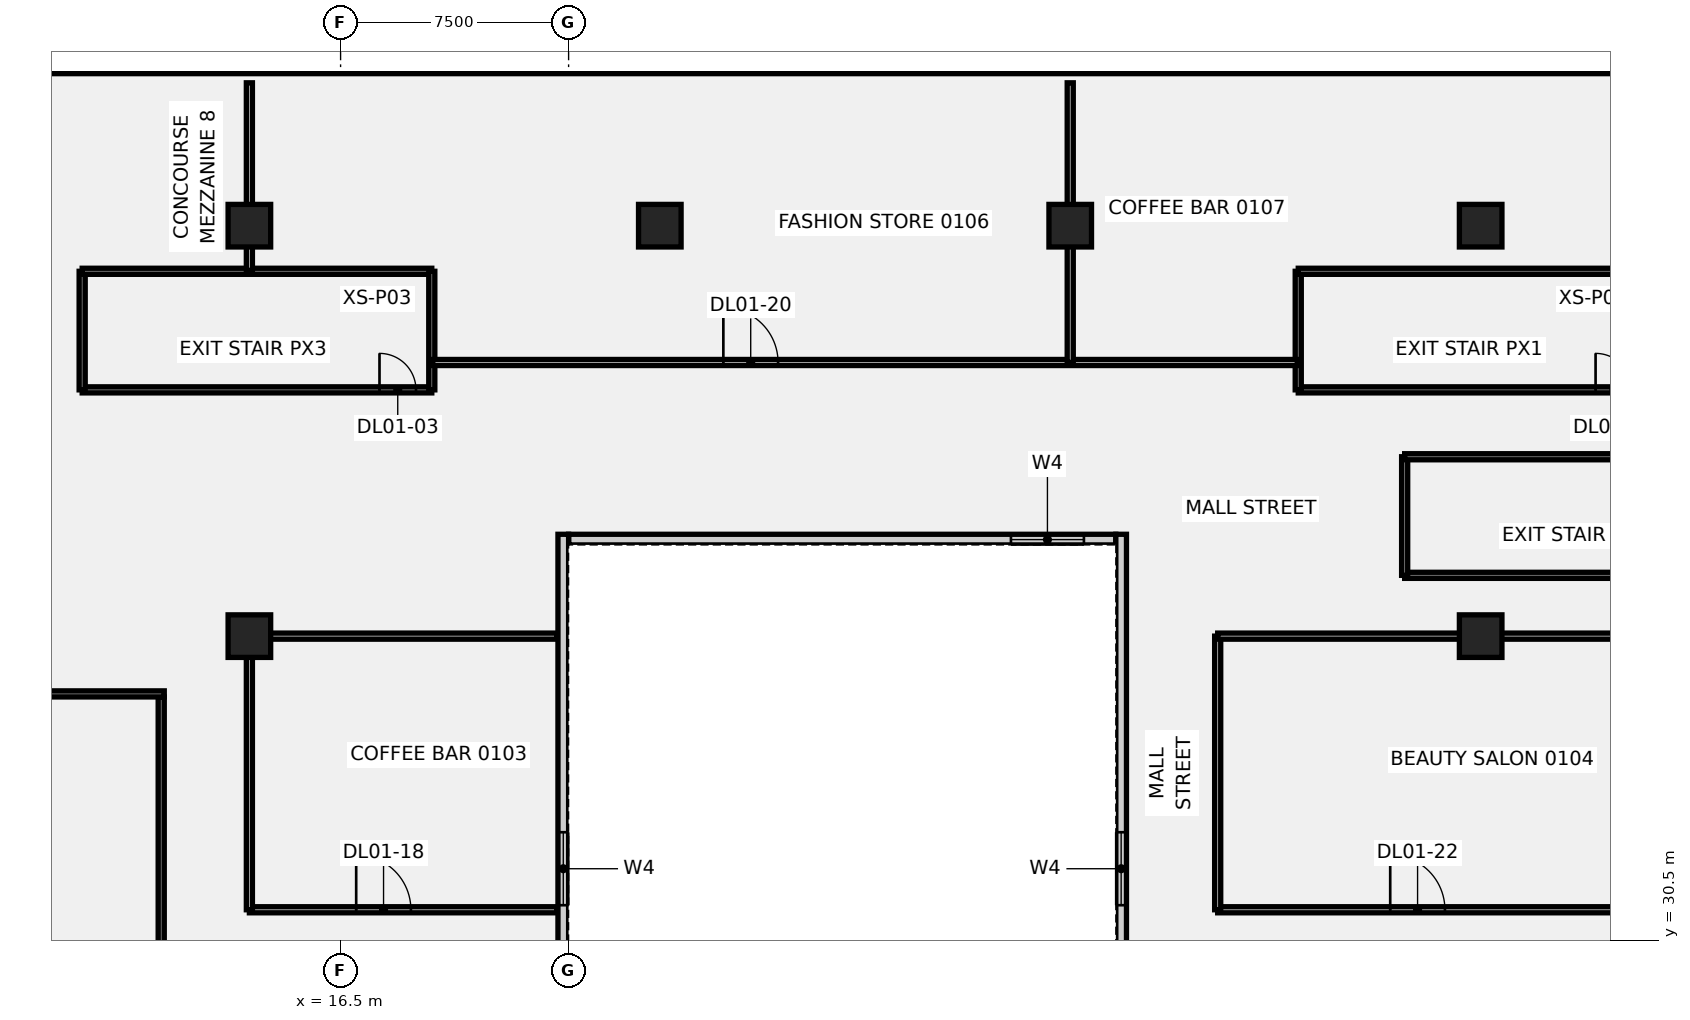
"""IFC4 building model, lengths in metres.
Left out: names, types, materials, properties, quantities, classifications, styles, units other than length and angle.
Written with IfcOpenShell. Run it as: python <this file> out.ifc"""

import sys

from ifc_helpers import new_model, si_unit, direction, frame, frame_2d, origin, origin_2d, place, context, subcontext, project, spatial, rectangle, extrude, element, fill, save


model = new_model("IFC4")
c1 = context("Model", 3, precision=1e-05, world=origin(), true_north=direction((0.0, 1.0)))
c2 = subcontext(c1, "Body", "Model", "MODEL_VIEW")
j1 = project(units=[si_unit("LENGTHUNIT", "METRE"), si_unit("PLANEANGLEUNIT", "RADIAN")], contexts=[c1])
p1 = place(None, origin())
s1 = spatial("IfcSite", under=j1, at=p1, CompositionType="ELEMENT")
p2 = place(p1, origin())
s2 = spatial("IfcBuilding", under=s1, at=p2, CompositionType="ELEMENT")
p3 = place(p2, frame((0.0, 0.0, 9.0)))
s3 = spatial("IfcBuildingStorey", under=s2, at=p3, CompositionType="ELEMENT", Elevation=9.0)
for number, where, z_axis, x_axis in (
    (1, (13.5, 40.5, -0.5), (0.0, 0.0, 1.0), (1.0, 0.0, 0.0)),
    (2, (13.5, 54.0, -0.5), (0.0, 0.0, 1.0), (1.0, 0.0, 0.0)),
    (3, (27.0, 54.0, -0.5), (0.0, 0.0, 1.0), (1.0, 0.0, 0.0)),
    (4, (40.5, 54.0, -0.5), (0.0, 0.0, 1.0), (1.0, 0.0, 0.0)),
    (5, (54.0, 40.5, -0.5), (0.0, 0.0, 1.0), (1.0, 0.0, 0.0)),
    (6, (54.0, 54.0, -0.5), (0.0, 0.0, 1.0), (1.0, 0.0, 0.0)),
):
    element("IfcColumn", number, at=place(p3, frame(where, z_axis=z_axis, x_axis=x_axis)), inside=s3, PredefinedType="COLUMN", context=c2, shape_type="SweptSolid", body=[
        extrude(rectangle(XDim=1.4, YDim=1.4, at=origin_2d()), origin(), (0.0, 0.0, 1.0), 6.0),
    ])
p4 = place(p3, frame((8.0, 48.6, 0.0), z_axis=(0.0, 0.0, 1.0), x_axis=(1.0, 0.0, 0.0)))
e7 = element("IfcWall", 7, at=p4, inside=s3, PredefinedType="PARTITIONING", context=c2, shape_type="SweptSolid", body=[
    extrude(rectangle(XDim=11.5, YDim=0.2, at=frame_2d((5.75, 0.0))), origin(), (0.0, 0.0, 1.0), 5.5),
])
p5 = place(p4, frame((9.78, 0.0, 0.0)))
e8 = element("IfcOpeningElement", 8, at=p5, cuts=e7, PredefinedType="OPENING", context=c2, shape_type="SweptSolid", body=[
    extrude(rectangle(XDim=1.2, YDim=2.1, at=frame_2d((0.6, 1.05))), frame((0.0, 0.11, 0.0), z_axis=(0.0, -1.0, 0.0), x_axis=(1.0, 0.0, 0.0)), (0.0, 0.0, 1.0), 0.22),
])
p6 = place(p3, frame((8.0, 48.6, 0.0), z_axis=(0.0, 0.0, 1.0), x_axis=(0.0, 1.0, 0.0)))
e9 = element("IfcWall", 9, at=p6, inside=s3, PredefinedType="PARTITIONING", context=c2, shape_type="SweptSolid", body=[
    extrude(rectangle(XDim=3.9, YDim=0.2, at=frame_2d((1.95, 0.0))), origin(), (0.0, 0.0, 1.0), 5.5),
])
p7 = place(p3, frame((8.0, 52.5, 0.0), z_axis=(0.0, 0.0, 1.0), x_axis=(1.0, 0.0, 0.0)))
e10 = element("IfcWall", 10, at=p7, inside=s3, PredefinedType="PARTITIONING", context=c2, shape_type="SweptSolid", body=[
    extrude(rectangle(XDim=11.5, YDim=0.2, at=frame_2d((5.75, 0.0))), origin(), (0.0, 0.0, 1.0), 5.5),
])
p8 = place(p3, frame((19.5, 48.6, 0.0), z_axis=(0.0, 0.0, 1.0), x_axis=(0.0, 1.0, 0.0)))
e11 = element("IfcWall", 11, at=p8, inside=s3, PredefinedType="PARTITIONING", context=c2, shape_type="SweptSolid", body=[
    extrude(rectangle(XDim=3.9, YDim=0.2, at=frame_2d((1.95, 0.0))), origin(), (0.0, 0.0, 1.0), 5.5),
])
p9 = place(p3, frame((48.0, 48.6, 0.0), z_axis=(0.0, 0.0, 1.0), x_axis=(1.0, 0.0, 0.0)))
e12 = element("IfcWall", 12, at=p9, inside=s3, PredefinedType="PARTITIONING", context=c2, shape_type="SweptSolid", body=[
    extrude(rectangle(XDim=11.5, YDim=0.2, at=frame_2d((5.75, 0.0))), origin(), (0.0, 0.0, 1.0), 5.5),
])
p10 = place(p9, frame((9.78, 0.0, 0.0)))
e13 = element("IfcOpeningElement", 13, at=p10, cuts=e12, PredefinedType="OPENING", context=c2, shape_type="SweptSolid", body=[
    extrude(rectangle(XDim=1.2, YDim=2.1, at=frame_2d((0.6, 1.05))), frame((0.0, 0.11, 0.0), z_axis=(0.0, -1.0, 0.0), x_axis=(1.0, 0.0, 0.0)), (0.0, 0.0, 1.0), 0.22),
])
p11 = place(p3, frame((48.0, 48.6, 0.0), z_axis=(0.0, 0.0, 1.0), x_axis=(0.0, 1.0, 0.0)))
e14 = element("IfcWall", 14, at=p11, inside=s3, PredefinedType="PARTITIONING", context=c2, shape_type="SweptSolid", body=[
    extrude(rectangle(XDim=3.9, YDim=0.2, at=frame_2d((1.95, 0.0))), origin(), (0.0, 0.0, 1.0), 5.5),
])
for number, where, z_axis, x_axis in (
    (15, (48.0, 52.5, 0.0), (0.0, 0.0, 1.0), (1.0, 0.0, 0.0)),
    (16, (51.5, 42.5, 0.0), (0.0, 0.0, 1.0), (1.0, 0.0, 0.0)),
):
    element("IfcWall", number, at=place(p3, frame(where, z_axis=z_axis, x_axis=x_axis)), inside=s3, PredefinedType="PARTITIONING", context=c2, shape_type="SweptSolid", body=[
        extrude(rectangle(XDim=11.5, YDim=0.2, at=frame_2d((5.75, 0.0))), origin(), (0.0, 0.0, 1.0), 5.5),
    ])
p12 = place(p3, frame((51.5, 42.5, 0.0), z_axis=(0.0, 0.0, 1.0), x_axis=(0.0, 1.0, 0.0)))
e17 = element("IfcWall", 17, at=p12, inside=s3, PredefinedType="PARTITIONING", context=c2, shape_type="SweptSolid", body=[
    extrude(rectangle(XDim=3.9, YDim=0.2, at=frame_2d((1.95, 0.0))), origin(), (0.0, 0.0, 1.0), 5.5),
])
p13 = place(p3, frame((51.5, 46.4, 0.0), z_axis=(0.0, 0.0, 1.0), x_axis=(1.0, 0.0, 0.0)))
e18 = element("IfcWall", 18, at=p13, inside=s3, PredefinedType="PARTITIONING", context=c2, shape_type="SweptSolid", body=[
    extrude(rectangle(XDim=11.5, YDim=0.2, at=frame_2d((5.75, 0.0))), origin(), (0.0, 0.0, 1.0), 5.5),
])
p14 = place(p3, frame((13.5, 52.53, 0.0), z_axis=(0.0, 0.0, 1.0), x_axis=(0.0, 1.0, 0.0)))
e19 = element("IfcWall", 19, at=p14, inside=s3, PredefinedType="PARTITIONING", context=c2, shape_type="SweptSolid", body=[
    extrude(rectangle(XDim=6.169, YDim=0.2, at=frame_2d((3.084, 0.0))), origin(), (0.0, 0.0, 1.0), 5.5),
])
p15 = place(p3, frame((19.53, 49.5, 0.0), z_axis=(0.0, 0.0, 1.0), x_axis=(1.0, 0.0, 0.0)))
e20 = element("IfcWall", 20, at=p15, inside=s3, PredefinedType="PARTITIONING", context=c2, shape_type="SweptSolid", body=[
    extrude(rectangle(XDim=28.44, YDim=0.2, at=frame_2d((14.22, 0.0))), origin(), (0.0, 0.0, 1.0), 5.5),
])
p16 = place(p15, frame((9.56, 0.0, 0.0)))
e21 = element("IfcOpeningElement", 21, at=p16, cuts=e20, PredefinedType="OPENING", context=c2, shape_type="SweptSolid", body=[
    extrude(rectangle(XDim=1.8, YDim=2.1, at=frame_2d((0.9, 1.05))), frame((0.0, 0.11, 0.0), z_axis=(0.0, -1.0, 0.0), x_axis=(1.0, 0.0, 0.0)), (0.0, 0.0, 1.0), 0.22),
])
p17 = place(p3, frame((13.5, 31.5, 0.0), z_axis=(0.0, 0.0, 1.0), x_axis=(1.0, 0.0, 0.0)))
e22 = element("IfcWall", 22, at=p17, inside=s3, PredefinedType="PARTITIONING", context=c2, shape_type="SweptSolid", body=[
    extrude(rectangle(XDim=10.12, YDim=0.2, at=frame_2d((5.06, 0.0))), origin(), (0.0, 0.0, 1.0), 5.5),
])
p18 = place(p17, frame((3.513, 0.0, 0.0)))
e23 = element("IfcOpeningElement", 23, at=p18, cuts=e22, PredefinedType="OPENING", context=c2, shape_type="SweptSolid", body=[
    extrude(rectangle(XDim=1.8, YDim=2.1, at=frame_2d((0.9, 1.05))), frame((0.0, 0.11, 0.0), z_axis=(0.0, -1.0, 0.0), x_axis=(1.0, 0.0, 0.0)), (0.0, 0.0, 1.0), 0.22),
])
p19 = place(p3, frame((13.5, 31.5, 0.0), z_axis=(0.0, 0.0, 1.0), x_axis=(0.0, 1.0, 0.0)))
e24 = element("IfcWall", 24, at=p19, inside=s3, PredefinedType="PARTITIONING", context=c2, shape_type="SweptSolid", body=[
    extrude(rectangle(XDim=9.0, YDim=0.2, at=frame_2d((4.5, 0.0))), origin(), (0.0, 0.0, 1.0), 5.5),
])
p20 = place(p3, frame((13.5, 40.5, 0.0), z_axis=(0.0, 0.0, 1.0), x_axis=(1.0, 0.0, 0.0)))
e25 = element("IfcWall", 25, at=p20, inside=s3, PredefinedType="PARTITIONING", context=c2, shape_type="SweptSolid", body=[
    extrude(rectangle(XDim=10.12, YDim=0.2, at=frame_2d((5.06, 0.0))), origin(), (0.0, 0.0, 1.0), 5.5),
])
p21 = place(p3, frame((40.5, 49.5, 0.0), z_axis=(0.0, 0.0, 1.0), x_axis=(0.0, 1.0, 0.0)))
e26 = element("IfcWall", 26, at=p21, inside=s3, PredefinedType="PARTITIONING", context=c2, shape_type="SweptSolid", body=[
    extrude(rectangle(XDim=9.199, YDim=0.2, at=frame_2d((4.6, 0.0))), origin(), (0.0, 0.0, 1.0), 5.5),
])
p22 = place(p3, frame((45.35, 31.5, 0.0), z_axis=(0.0, 0.0, 1.0), x_axis=(1.0, 0.0, 0.0)))
e27 = element("IfcWall", 27, at=p22, inside=s3, PredefinedType="PARTITIONING", context=c2, shape_type="SweptSolid", body=[
    extrude(rectangle(XDim=22.349, YDim=0.2, at=frame_2d((11.174, 0.0))), origin(), (0.0, 0.0, 1.0), 5.5),
])
p23 = place(p22, frame((16.85, 0.0, 0.0)))
e28 = element("IfcOpeningElement", 28, at=p23, cuts=e27, PredefinedType="OPENING", context=c2, shape_type="SweptSolid", body=[
    extrude(rectangle(XDim=1.8, YDim=2.1, at=frame_2d((0.9, 1.05))), frame((0.0, 0.11, 0.0), z_axis=(0.0, -1.0, 0.0), x_axis=(1.0, 0.0, 0.0)), (0.0, 0.0, 1.0), 0.22),
])
p24 = place(p22, frame((5.675, 0.0, 0.0)))
e29 = element("IfcOpeningElement", 29, at=p24, cuts=e27, PredefinedType="OPENING", context=c2, shape_type="SweptSolid", body=[
    extrude(rectangle(XDim=1.8, YDim=2.1, at=frame_2d((0.9, 1.05))), frame((0.0, 0.11, 0.0), z_axis=(0.0, -1.0, 0.0), x_axis=(1.0, 0.0, 0.0)), (0.0, 0.0, 1.0), 0.22),
])
p25 = place(p3, frame((45.35, 31.5, 0.0), z_axis=(0.0, 0.0, 1.0), x_axis=(0.0, 1.0, 0.0)))
e30 = element("IfcWall", 30, at=p25, inside=s3, PredefinedType="PARTITIONING", context=c2, shape_type="SweptSolid", body=[
    extrude(rectangle(XDim=9.0, YDim=0.2, at=frame_2d((4.5, 0.0))), origin(), (0.0, 0.0, 1.0), 5.5),
])
p26 = place(p3, frame((45.35, 40.5, 0.0), z_axis=(0.0, 0.0, 1.0), x_axis=(1.0, 0.0, 0.0)))
e31 = element("IfcWall", 31, at=p26, inside=s3, PredefinedType="PARTITIONING", context=c2, shape_type="SweptSolid", body=[
    extrude(rectangle(XDim=22.349, YDim=0.2, at=frame_2d((11.174, 0.0))), origin(), (0.0, 0.0, 1.0), 5.5),
])
p27 = place(p3, frame((10.6, 28.8, 0.0), z_axis=(0.0, 0.0, 1.0), x_axis=(0.0, 1.0, 0.0)))
e32 = element("IfcWall", 32, at=p27, inside=s3, PredefinedType="SOLIDWALL", context=c2, shape_type="SweptSolid", body=[
    extrude(rectangle(XDim=9.7, YDim=0.2, at=frame_2d((4.85, 0.0))), origin(), (0.0, 0.0, 1.0), 5.5),
])
p28 = place(p3, frame((10.7, 38.6, 0.0), z_axis=(0.0, 0.0, 1.0), x_axis=(-1.0, 0.0, 0.0)))
e33 = element("IfcWall", 33, at=p28, inside=s3, PredefinedType="SOLIDWALL", context=c2, shape_type="SweptSolid", body=[
    extrude(rectangle(XDim=4.3, YDim=0.2, at=frame_2d((2.15, 0.0))), origin(), (0.0, 0.0, 1.0), 5.5),
])
p29 = place(p3, frame((24.0, 43.675, 0.0), z_axis=(0.0, 0.0, 1.0), x_axis=(1.0, 0.0, 0.0)))
e34 = element("IfcWall", 34, at=p29, inside=s3, PredefinedType="SOLIDWALL", context=c2, shape_type="SweptSolid", body=[
    extrude(rectangle(XDim=18.0, YDim=0.35, at=frame_2d((9.0, 0.0))), origin(), (0.0, 0.0, 1.0), 5.5),
])
p30 = place(p29, frame((14.55, 0.0, 1.0)))
e35 = element("IfcOpeningElement", 35, at=p30, cuts=e34, PredefinedType="OPENING", context=c2, shape_type="SweptSolid", body=[
    extrude(rectangle(XDim=2.4, YDim=1.8, at=frame_2d((1.2, 0.9))), frame((0.0, 0.185, 0.0), z_axis=(0.0, -1.0, 0.0), x_axis=(1.0, 0.0, 0.0)), (0.0, 0.0, 1.0), 0.37),
])
p31 = place(p3, frame((23.825, 16.45, 0.0), z_axis=(0.0, 0.0, 1.0), x_axis=(0.0, 1.0, 0.0)))
e36 = element("IfcWall", 36, at=p31, inside=s3, PredefinedType="SOLIDWALL", context=c2, shape_type="SweptSolid", body=[
    extrude(rectangle(XDim=27.4, YDim=0.35, at=frame_2d((13.7, 0.0))), origin(), (0.0, 0.0, 1.0), 5.5),
])
p32 = place(p31, frame((15.2, 0.0, 1.0)))
e37 = element("IfcOpeningElement", 37, at=p32, cuts=e36, PredefinedType="OPENING", context=c2, shape_type="SweptSolid", body=[
    extrude(rectangle(XDim=2.4, YDim=1.8, at=frame_2d((1.2, 0.9))), frame((0.0, 0.185, 0.0), z_axis=(0.0, -1.0, 0.0), x_axis=(1.0, 0.0, 0.0)), (0.0, 0.0, 1.0), 0.37),
])
p33 = place(p3, frame((42.175, 16.45, 0.0), z_axis=(0.0, 0.0, 1.0), x_axis=(0.0, 1.0, 0.0)))
e38 = element("IfcWall", 38, at=p33, inside=s3, PredefinedType="SOLIDWALL", context=c2, shape_type="SweptSolid", body=[
    extrude(rectangle(XDim=27.4, YDim=0.35, at=frame_2d((13.7, 0.0))), origin(), (0.0, 0.0, 1.0), 5.5),
])
p34 = place(p33, frame((15.2, 0.0, 1.0)))
e39 = element("IfcOpeningElement", 39, at=p34, cuts=e38, PredefinedType="OPENING", context=c2, shape_type="SweptSolid", body=[
    extrude(rectangle(XDim=2.4, YDim=1.8, at=frame_2d((1.2, 0.9))), frame((0.0, 0.185, 0.0), z_axis=(0.0, -1.0, 0.0), x_axis=(1.0, 0.0, 0.0)), (0.0, 0.0, 1.0), 0.37),
])
p35 = place(p10, origin())
e40 = element("IfcDoor", 40, at=p35, inside=s3, OperationType="SINGLE_SWING_LEFT", PredefinedType="DOOR", context=c2, shape_type="SweptSolid", body=[
    extrude(rectangle(XDim=1.2, YDim=2.1, at=frame_2d((0.6, 1.05))), frame((0.0, 0.025, 0.0), z_axis=(0.0, -1.0, 0.0), x_axis=(1.0, 0.0, 0.0)), (0.0, 0.0, 1.0), 0.05),
])
fill(e13, e40)
p36 = place(p5, origin())
e41 = element("IfcDoor", 41, at=p36, inside=s3, OperationType="SINGLE_SWING_LEFT", PredefinedType="DOOR", context=c2, shape_type="SweptSolid", body=[
    extrude(rectangle(XDim=1.2, YDim=2.1, at=frame_2d((0.6, 1.05))), frame((0.0, 0.025, 0.0), z_axis=(0.0, -1.0, 0.0), x_axis=(1.0, 0.0, 0.0)), (0.0, 0.0, 1.0), 0.05),
])
fill(e8, e41)
p37 = place(p18, origin())
e42 = element("IfcDoor", 42, at=p37, inside=s3, OperationType="SINGLE_SWING_RIGHT", PredefinedType="DOOR", context=c2, shape_type="SweptSolid", body=[
    extrude(rectangle(XDim=1.8, YDim=2.1, at=frame_2d((0.9, 1.05))), frame((0.0, 0.025, 0.0), z_axis=(0.0, -1.0, 0.0), x_axis=(1.0, 0.0, 0.0)), (0.0, 0.0, 1.0), 0.05),
])
fill(e23, e42)
p38 = place(p16, origin())
e43 = element("IfcDoor", 43, at=p38, inside=s3, OperationType="SINGLE_SWING_RIGHT", PredefinedType="DOOR", context=c2, shape_type="SweptSolid", body=[
    extrude(rectangle(XDim=1.8, YDim=2.1, at=frame_2d((0.9, 1.05))), frame((0.0, 0.025, 0.0), z_axis=(0.0, -1.0, 0.0), x_axis=(1.0, 0.0, 0.0)), (0.0, 0.0, 1.0), 0.05),
])
fill(e21, e43)
p39 = place(p24, origin())
e44 = element("IfcDoor", 44, at=p39, inside=s3, OperationType="SINGLE_SWING_RIGHT", PredefinedType="DOOR", context=c2, shape_type="SweptSolid", body=[
    extrude(rectangle(XDim=1.8, YDim=2.1, at=frame_2d((0.9, 1.05))), frame((0.0, 0.025, 0.0), z_axis=(0.0, -1.0, 0.0), x_axis=(1.0, 0.0, 0.0)), (0.0, 0.0, 1.0), 0.05),
])
fill(e29, e44)
p40 = place(p30, origin())
e45 = element("IfcWindow", 45, at=p40, inside=s3, PartitioningType="SINGLE_PANEL", PredefinedType="WINDOW", context=c2, shape_type="SweptSolid", body=[
    extrude(rectangle(XDim=2.4, YDim=1.8, at=frame_2d((1.2, 0.9))), frame((0.0, 0.03, 0.0), z_axis=(0.0, -1.0, 0.0), x_axis=(1.0, 0.0, 0.0)), (0.0, 0.0, 1.0), 0.06),
])
fill(e35, e45)
p41 = place(p32, origin())
e46 = element("IfcWindow", 46, at=p41, inside=s3, PartitioningType="SINGLE_PANEL", PredefinedType="WINDOW", context=c2, shape_type="SweptSolid", body=[
    extrude(rectangle(XDim=2.4, YDim=1.8, at=frame_2d((1.2, 0.9))), frame((0.0, 0.03, 0.0), z_axis=(0.0, -1.0, 0.0), x_axis=(1.0, 0.0, 0.0)), (0.0, 0.0, 1.0), 0.06),
])
fill(e37, e46)
p42 = place(p34, origin())
e47 = element("IfcWindow", 47, at=p42, inside=s3, PartitioningType="SINGLE_PANEL", PredefinedType="WINDOW", context=c2, shape_type="SweptSolid", body=[
    extrude(rectangle(XDim=2.4, YDim=1.8, at=frame_2d((1.2, 0.9))), frame((0.0, 0.03, 0.0), z_axis=(0.0, -1.0, 0.0), x_axis=(1.0, 0.0, 0.0)), (0.0, 0.0, 1.0), 0.06),
])
fill(e39, e47)
save(model, sys.argv[1])
